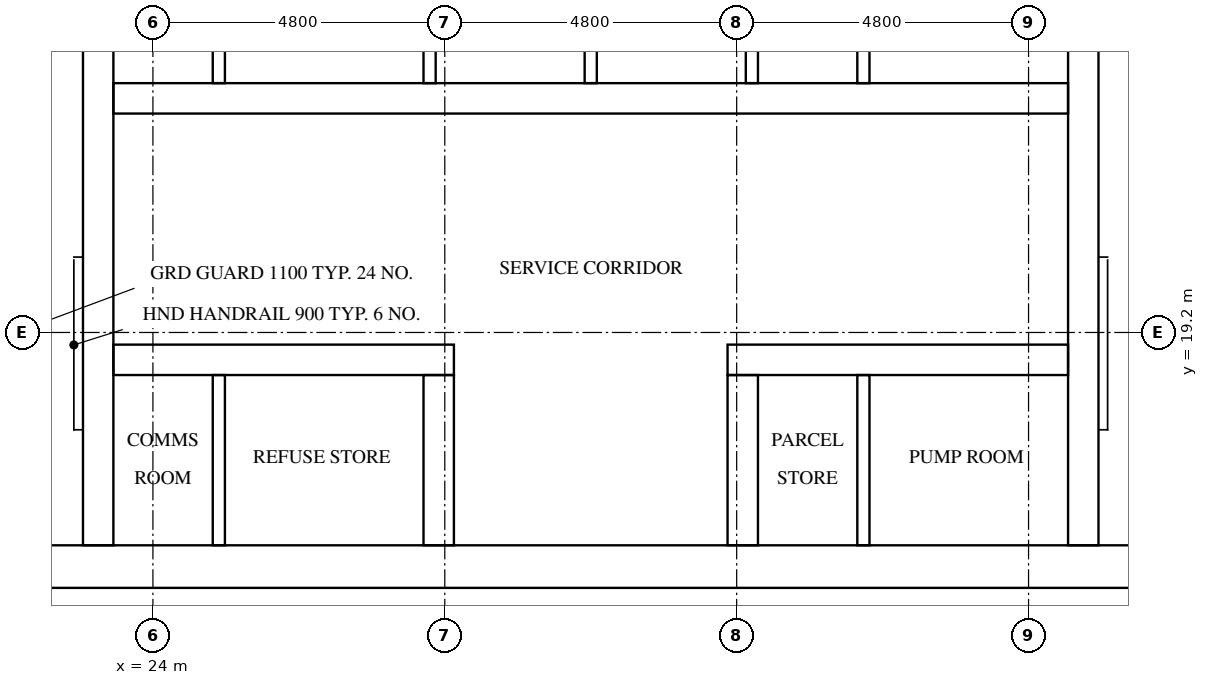
"""IFC4 building model, lengths in metres.
Left out: names, types, materials, properties, quantities, classifications, styles, units other than length and angle.
Written with IfcOpenShell. Run it as: python <this file> out.ifc"""

import sys

from ifc_helpers import new_model, si_unit, direction, frame, frame_2d, origin, place, context, subcontext, project, spatial, rectangle, extrude, element, fill, save


model = new_model("IFC4")
c1 = context("Model", 3, precision=1e-05, world=origin(), true_north=direction((0.0, 1.0)))
c2 = subcontext(c1, "Body", "Model", "MODEL_VIEW")
j1 = project(units=[si_unit("LENGTHUNIT", "METRE"), si_unit("PLANEANGLEUNIT", "RADIAN")], contexts=[c1])
p1 = place(None, origin())
s1 = spatial("IfcSite", under=j1, at=p1, CompositionType="ELEMENT")
p2 = place(p1, origin())
s2 = spatial("IfcBuilding", under=s1, at=p2, CompositionType="ELEMENT")
p3 = place(p2, frame((0.0, 0.0, 178.9)))
s3 = spatial("IfcBuildingStorey", under=s2, at=p3, CompositionType="ELEMENT", Elevation=178.9)
p4 = place(p3, frame((15.0, 15.35, 0.0), z_axis=(0.0, 0.0, 1.0), x_axis=(1.0, 0.0, 0.0)))
e1 = element("IfcWall", 1, at=p4, inside=s3, PredefinedType="SHEAR", context=c2, shape_type="SweptSolid", body=[
    extrude(rectangle(XDim=32.4, YDim=0.7, at=frame_2d((16.2, 0.0))), origin(), (0.0, 0.0, 1.0), 3.2),
])
p5 = place(p4, frame((15.3, 0.0, 0.0)))
e2 = element("IfcOpeningElement", 2, at=p5, cuts=e1, PredefinedType="OPENING", context=c2, shape_type="SweptSolid", body=[
    extrude(rectangle(XDim=1.8, YDim=2.1, at=frame_2d((0.9, 1.05))), frame((0.0, 0.36, 0.0), z_axis=(0.0, -1.0, 0.0), x_axis=(1.0, 0.0, 0.0)), (0.0, 0.0, 1.0), 0.72),
])
p6 = place(p3, frame((23.1, 15.7, 0.0), z_axis=(0.0, 0.0, 1.0), x_axis=(0.0, 1.0, 0.0)))
e3 = element("IfcWall", 3, at=p6, inside=s3, PredefinedType="SHEAR", context=c2, shape_type="SweptSolid", body=[
    extrude(rectangle(XDim=21.4, YDim=0.5, at=frame_2d((10.7, 0.0))), origin(), (0.0, 0.0, 1.0), 3.2),
])
p7 = place(p3, frame((39.3, 15.7, 0.0), z_axis=(0.0, 0.0, 1.0), x_axis=(0.0, 1.0, 0.0)))
e4 = element("IfcWall", 4, at=p7, inside=s3, PredefinedType="SHEAR", context=c2, shape_type="SweptSolid", body=[
    extrude(rectangle(XDim=8.55, YDim=0.5, at=frame_2d((4.275, 0.0))), origin(), (0.0, 0.0, 1.0), 3.2),
])
p8 = place(p3, frame((23.35, 18.75, 0.0), z_axis=(0.0, 0.0, 1.0), x_axis=(1.0, 0.0, 0.0)))
e5 = element("IfcWall", 5, at=p8, inside=s3, PredefinedType="SHEAR", context=c2, shape_type="SweptSolid", body=[
    extrude(rectangle(XDim=5.6, YDim=0.5, at=frame_2d((2.8, 0.0))), origin(), (0.0, 0.0, 1.0), 3.2),
])
p9 = place(p8, frame((0.317, 0.0, 0.0)))
e6 = element("IfcOpeningElement", 6, at=p9, cuts=e5, PredefinedType="OPENING", context=c2, shape_type="SweptSolid", body=[
    extrude(rectangle(XDim=1.0, YDim=2.1, at=frame_2d((0.5, 1.05))), frame((0.0, 0.26, 0.0), z_axis=(0.0, -1.0, 0.0), x_axis=(1.0, 0.0, 0.0)), (0.0, 0.0, 1.0), 0.52),
])
p10 = place(p8, frame((2.967, 0.0, 0.0)))
e7 = element("IfcOpeningElement", 7, at=p10, cuts=e5, PredefinedType="OPENING", context=c2, shape_type="SweptSolid", body=[
    extrude(rectangle(XDim=1.0, YDim=2.1, at=frame_2d((0.5, 1.05))), frame((0.0, 0.26, 0.0), z_axis=(0.0, -1.0, 0.0), x_axis=(1.0, 0.0, 0.0)), (0.0, 0.0, 1.0), 0.52),
])
p11 = place(p3, frame((33.45, 18.75, 0.0), z_axis=(0.0, 0.0, 1.0), x_axis=(1.0, 0.0, 0.0)))
e8 = element("IfcWall", 8, at=p11, inside=s3, PredefinedType="SHEAR", context=c2, shape_type="SweptSolid", body=[
    extrude(rectangle(XDim=5.6, YDim=0.5, at=frame_2d((2.8, 0.0))), origin(), (0.0, 0.0, 1.0), 3.2),
])
p12 = place(p11, frame((0.817, 0.0, 0.0)))
e9 = element("IfcOpeningElement", 9, at=p12, cuts=e8, PredefinedType="OPENING", context=c2, shape_type="SweptSolid", body=[
    extrude(rectangle(XDim=1.0, YDim=2.1, at=frame_2d((0.5, 1.05))), frame((0.0, 0.26, 0.0), z_axis=(0.0, -1.0, 0.0), x_axis=(1.0, 0.0, 0.0)), (0.0, 0.0, 1.0), 0.52),
])
p13 = place(p11, frame((3.467, 0.0, 0.0)))
e10 = element("IfcOpeningElement", 10, at=p13, cuts=e8, PredefinedType="OPENING", context=c2, shape_type="SweptSolid", body=[
    extrude(rectangle(XDim=1.0, YDim=2.1, at=frame_2d((0.5, 1.05))), frame((0.0, 0.26, 0.0), z_axis=(0.0, -1.0, 0.0), x_axis=(1.0, 0.0, 0.0)), (0.0, 0.0, 1.0), 0.52),
])
p14 = place(p3, frame((23.35, 23.05, 0.0), z_axis=(0.0, 0.0, 1.0), x_axis=(1.0, 0.0, 0.0)))
e11 = element("IfcWall", 11, at=p14, inside=s3, PredefinedType="SHEAR", context=c2, shape_type="SweptSolid", body=[
    extrude(rectangle(XDim=15.7, YDim=0.5, at=frame_2d((7.85, 0.0))), origin(), (0.0, 0.0, 1.0), 3.2),
])
p15 = place(p14, frame((0.317, 0.0, 0.0)))
e12 = element("IfcOpeningElement", 12, at=p15, cuts=e11, PredefinedType="OPENING", context=c2, shape_type="SweptSolid", body=[
    extrude(rectangle(XDim=1.0, YDim=2.1, at=frame_2d((0.5, 1.05))), frame((0.0, 0.26, 0.0), z_axis=(0.0, -1.0, 0.0), x_axis=(1.0, 0.0, 0.0)), (0.0, 0.0, 1.0), 0.52),
])
p16 = place(p14, frame((2.967, 0.0, 0.0)))
e13 = element("IfcOpeningElement", 13, at=p16, cuts=e11, PredefinedType="OPENING", context=c2, shape_type="SweptSolid", body=[
    extrude(rectangle(XDim=1.0, YDim=2.1, at=frame_2d((0.5, 1.05))), frame((0.0, 0.26, 0.0), z_axis=(0.0, -1.0, 0.0), x_axis=(1.0, 0.0, 0.0)), (0.0, 0.0, 1.0), 0.52),
])
p17 = place(p14, frame((10.917, 0.0, 0.0)))
e14 = element("IfcOpeningElement", 14, at=p17, cuts=e11, PredefinedType="OPENING", context=c2, shape_type="SweptSolid", body=[
    extrude(rectangle(XDim=1.0, YDim=2.1, at=frame_2d((0.5, 1.05))), frame((0.0, 0.26, 0.0), z_axis=(0.0, -1.0, 0.0), x_axis=(1.0, 0.0, 0.0)), (0.0, 0.0, 1.0), 0.52),
])
p18 = place(p14, frame((13.567, 0.0, 0.0)))
e15 = element("IfcOpeningElement", 15, at=p18, cuts=e11, PredefinedType="OPENING", context=c2, shape_type="SweptSolid", body=[
    extrude(rectangle(XDim=1.0, YDim=2.1, at=frame_2d((0.5, 1.05))), frame((0.0, 0.26, 0.0), z_axis=(0.0, -1.0, 0.0), x_axis=(1.0, 0.0, 0.0)), (0.0, 0.0, 1.0), 0.52),
])
for number, where, z_axis, x_axis in (
    (16, (28.7, 15.7, 0.0), (0.0, 0.0, 1.0), (0.0, 1.0, 0.0)),
    (17, (33.7, 15.7, 0.0), (0.0, 0.0, 1.0), (0.0, 1.0, 0.0)),
):
    element("IfcWall", number, at=place(p3, frame(where, z_axis=z_axis, x_axis=x_axis)), inside=s3, PredefinedType="SHEAR", context=c2, shape_type="SweptSolid", body=[
        extrude(rectangle(XDim=2.8, YDim=0.5, at=frame_2d((1.4, 0.0))), origin(), (0.0, 0.0, 1.0), 3.2),
    ])
for number, where, z_axis, x_axis in (
    (18, (28.55, 23.3, 0.0), (0.0, 0.0, 1.0), (0.0, 1.0, 0.0)),
    (19, (31.2, 23.3, 0.0), (0.0, 0.0, 1.0), (0.0, 1.0, 0.0)),
    (20, (33.85, 23.3, 0.0), (0.0, 0.0, 1.0), (0.0, 1.0, 0.0)),
):
    element("IfcWall", number, at=place(p3, frame(where, z_axis=z_axis, x_axis=x_axis)), inside=s3, PredefinedType="SOLIDWALL", context=c2, shape_type="SweptSolid", body=[
        extrude(rectangle(XDim=2.6, YDim=0.2, at=frame_2d((1.3, 0.0))), origin(), (0.0, 0.0, 1.0), 3.2),
    ])
for number, where, z_axis, x_axis in (
    (21, (25.084, 23.3, 0.0), (0.0, 0.0, 1.0), (0.0, 1.0, 0.0)),
    (22, (35.684, 23.3, 0.0), (0.0, 0.0, 1.0), (0.0, 1.0, 0.0)),
):
    element("IfcWall", number, at=place(p3, frame(where, z_axis=z_axis, x_axis=x_axis)), inside=s3, PredefinedType="PARTITIONING", context=c2, shape_type="SweptSolid", body=[
        extrude(rectangle(XDim=2.6, YDim=0.2, at=frame_2d((1.3, 0.0))), origin(), (0.0, 0.0, 1.0), 3.2),
    ])
for number, where, z_axis, x_axis in (
    (23, (25.084, 15.7, 0.0), (0.0, 0.0, 1.0), (0.0, 1.0, 0.0)),
    (24, (35.684, 15.7, 0.0), (0.0, 0.0, 1.0), (0.0, 1.0, 0.0)),
):
    element("IfcWall", number, at=place(p3, frame(where, z_axis=z_axis, x_axis=x_axis)), inside=s3, PredefinedType="PARTITIONING", context=c2, shape_type="SweptSolid", body=[
        extrude(rectangle(XDim=2.8, YDim=0.2, at=frame_2d((1.4, 0.0))), origin(), (0.0, 0.0, 1.0), 3.2),
    ])
p19 = place(p5, frame((1.8, 0.0, 0.0), z_axis=(0.0, 0.0, 1.0), x_axis=(-1.0, 0.0, 0.0)))
e25 = element("IfcDoor", 25, at=p19, inside=s3, OperationType="DOUBLE_DOOR_SINGLE_SWING", PredefinedType="DOOR", context=c2, shape_type="SweptSolid", body=[
    extrude(rectangle(XDim=1.8, YDim=2.1, at=frame_2d((0.9, 1.05))), frame((0.0, 0.025, 0.0), z_axis=(0.0, -1.0, 0.0), x_axis=(1.0, 0.0, 0.0)), (0.0, 0.0, 1.0), 0.05),
])
fill(e2, e25)
p20 = place(p15, frame((1.0, 0.0, 0.0), z_axis=(0.0, 0.0, 1.0), x_axis=(-1.0, 0.0, 0.0)))
e26 = element("IfcDoor", 26, at=p20, inside=s3, OperationType="SINGLE_SWING_LEFT", PredefinedType="DOOR", context=c2, shape_type="SweptSolid", body=[
    extrude(rectangle(XDim=1.0, YDim=2.1, at=frame_2d((0.5, 1.05))), frame((0.0, 0.025, 0.0), z_axis=(0.0, -1.0, 0.0), x_axis=(1.0, 0.0, 0.0)), (0.0, 0.0, 1.0), 0.05),
])
fill(e12, e26)
p21 = place(p16, frame((1.0, 0.0, 0.0), z_axis=(0.0, 0.0, 1.0), x_axis=(-1.0, 0.0, 0.0)))
e27 = element("IfcDoor", 27, at=p21, inside=s3, OperationType="SINGLE_SWING_RIGHT", PredefinedType="DOOR", context=c2, shape_type="SweptSolid", body=[
    extrude(rectangle(XDim=1.0, YDim=2.1, at=frame_2d((0.5, 1.05))), frame((0.0, 0.025, 0.0), z_axis=(0.0, -1.0, 0.0), x_axis=(1.0, 0.0, 0.0)), (0.0, 0.0, 1.0), 0.05),
])
fill(e13, e27)
p22 = place(p17, frame((1.0, 0.0, 0.0), z_axis=(0.0, 0.0, 1.0), x_axis=(-1.0, 0.0, 0.0)))
e28 = element("IfcDoor", 28, at=p22, inside=s3, OperationType="SINGLE_SWING_LEFT", PredefinedType="DOOR", context=c2, shape_type="SweptSolid", body=[
    extrude(rectangle(XDim=1.0, YDim=2.1, at=frame_2d((0.5, 1.05))), frame((0.0, 0.025, 0.0), z_axis=(0.0, -1.0, 0.0), x_axis=(1.0, 0.0, 0.0)), (0.0, 0.0, 1.0), 0.05),
])
fill(e14, e28)
p23 = place(p18, frame((1.0, 0.0, 0.0), z_axis=(0.0, 0.0, 1.0), x_axis=(-1.0, 0.0, 0.0)))
e29 = element("IfcDoor", 29, at=p23, inside=s3, OperationType="SINGLE_SWING_RIGHT", PredefinedType="DOOR", context=c2, shape_type="SweptSolid", body=[
    extrude(rectangle(XDim=1.0, YDim=2.1, at=frame_2d((0.5, 1.05))), frame((0.0, 0.025, 0.0), z_axis=(0.0, -1.0, 0.0), x_axis=(1.0, 0.0, 0.0)), (0.0, 0.0, 1.0), 0.05),
])
fill(e15, e29)
p24 = place(p9, origin())
e30 = element("IfcDoor", 30, at=p24, inside=s3, OperationType="SINGLE_SWING_LEFT", PredefinedType="DOOR", context=c2, shape_type="SweptSolid", body=[
    extrude(rectangle(XDim=1.0, YDim=2.1, at=frame_2d((0.5, 1.05))), frame((0.0, 0.025, 0.0), z_axis=(0.0, -1.0, 0.0), x_axis=(1.0, 0.0, 0.0)), (0.0, 0.0, 1.0), 0.05),
])
fill(e6, e30)
p25 = place(p10, origin())
e31 = element("IfcDoor", 31, at=p25, inside=s3, OperationType="SINGLE_SWING_RIGHT", PredefinedType="DOOR", context=c2, shape_type="SweptSolid", body=[
    extrude(rectangle(XDim=1.0, YDim=2.1, at=frame_2d((0.5, 1.05))), frame((0.0, 0.025, 0.0), z_axis=(0.0, -1.0, 0.0), x_axis=(1.0, 0.0, 0.0)), (0.0, 0.0, 1.0), 0.05),
])
fill(e7, e31)
p26 = place(p12, origin())
e32 = element("IfcDoor", 32, at=p26, inside=s3, OperationType="SINGLE_SWING_LEFT", PredefinedType="DOOR", context=c2, shape_type="SweptSolid", body=[
    extrude(rectangle(XDim=1.0, YDim=2.1, at=frame_2d((0.5, 1.05))), frame((0.0, 0.025, 0.0), z_axis=(0.0, -1.0, 0.0), x_axis=(1.0, 0.0, 0.0)), (0.0, 0.0, 1.0), 0.05),
])
fill(e9, e32)
p27 = place(p13, origin())
e33 = element("IfcDoor", 33, at=p27, inside=s3, OperationType="SINGLE_SWING_RIGHT", PredefinedType="DOOR", context=c2, shape_type="SweptSolid", body=[
    extrude(rectangle(XDim=1.0, YDim=2.1, at=frame_2d((0.5, 1.05))), frame((0.0, 0.025, 0.0), z_axis=(0.0, -1.0, 0.0), x_axis=(1.0, 0.0, 0.0)), (0.0, 0.0, 1.0), 0.05),
])
fill(e10, e33)
save(model, sys.argv[1])
